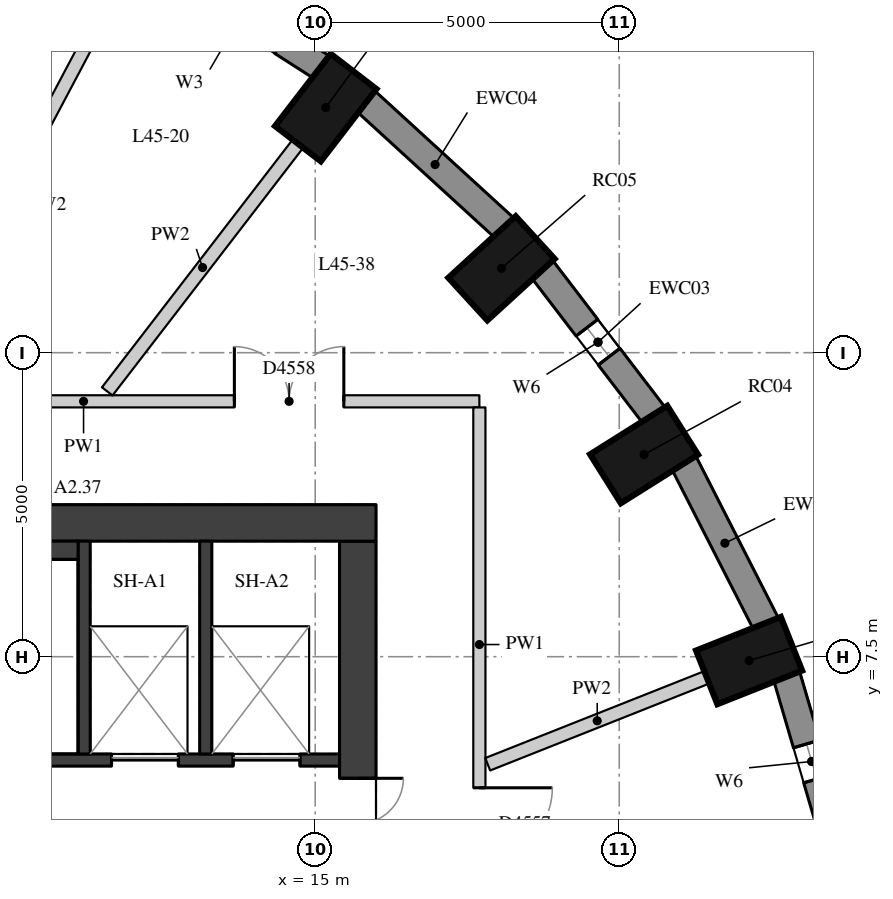
"""IFC4 building model, lengths in metres.
Left out: names, types, materials, properties, quantities, classifications, styles, units other than length and angle.
Written with IfcOpenShell. Run it as: python <this file> out.ifc"""

import sys

from ifc_helpers import new_model, si_unit, direction, frame, frame_2d, origin, origin_2d, place, context, subcontext, project, spatial, rectangle, extrude, element, fill, save


model = new_model("IFC4")
c1 = context("Model", 3, precision=1e-05, world=origin(), true_north=direction((0.0, 1.0)))
c2 = subcontext(c1, "Body", "Model", "MODEL_VIEW")
j1 = project(units=[si_unit("LENGTHUNIT", "METRE"), si_unit("PLANEANGLEUNIT", "RADIAN")], contexts=[c1])
p1 = place(None, origin())
s1 = spatial("IfcSite", under=j1, at=p1, CompositionType="ELEMENT")
p2 = place(p1, origin())
s2 = spatial("IfcBuilding", under=s1, at=p2, CompositionType="ELEMENT")
p3 = place(p2, frame((0.0, 0.0, 161.6)))
s3 = spatial("IfcBuildingStorey", under=s2, at=p3, CompositionType="ELEMENT", Elevation=161.6)
for number, where, z_axis, x_axis in (
    (1, (22.136, 7.436, 0.0), (0.0, 0.0, 1.0), (0.93, 0.369, 0.0)),
    (2, (20.408, 10.825, 0.0), (0.0, 0.0, 1.0), (0.846, 0.533, 0.0)),
    (3, (18.064, 13.888, 0.0), (0.0, 0.0, 1.0), (0.738, 0.675, 0.0)),
    (4, (15.173, 16.532, 0.0), (0.0, 0.0, 1.0), (0.61, 0.792, 0.0)),
):
    element("IfcColumn", number, at=place(p3, frame(where, z_axis=z_axis, x_axis=x_axis)), inside=s3, PredefinedType="COLUMN", context=c2, shape_type="SweptSolid", body=[
        extrude(rectangle(XDim=1.5, YDim=0.95, at=origin_2d()), origin(), (0.0, 0.0, 1.0), 3.3),
    ])
p4 = place(p3, frame((23.58, 4.362, 0.0), z_axis=(0.0, 0.0, 1.0), x_axis=(-0.281049481624, 0.959693278542, 0.0)))
e5 = element("IfcWall", 5, at=p4, inside=s3, PredefinedType="SOLIDWALL", context=c2, shape_type="SweptSolid", body=[
    extrude(rectangle(XDim=2.948, YDim=0.45, at=frame_2d((1.474, 0.0))), origin(), (0.0, 0.0, 1.0), 3.02),
])
p5 = place(p4, frame((1.174, 0.0, 0.4)))
e6 = element("IfcOpeningElement", 6, at=p5, cuts=e5, PredefinedType="OPENING", context=c2, shape_type="SweptSolid", body=[
    extrude(rectangle(XDim=0.6, YDim=1.75, at=frame_2d((0.3, 0.875))), frame((0.0, 0.235, 0.0), z_axis=(0.0, -1.0, 0.0), x_axis=(1.0, 0.0, 0.0)), (0.0, 0.0, 1.0), 0.47),
])
p6 = place(p3, frame((22.415, 8.037, 0.0), z_axis=(0.0, 0.0, 1.0), x_axis=(-0.454133999889, 0.890933392653, 0.0)))
e7 = element("IfcWall", 7, at=p6, inside=s3, PredefinedType="SOLIDWALL", context=c2, shape_type="SweptSolid", body=[
    extrude(rectangle(XDim=2.986, YDim=0.45, at=frame_2d((1.493, 0.0))), origin(), (0.0, 0.0, 1.0), 3.02),
])
p7 = place(p3, frame((20.574, 11.467, 0.0), z_axis=(0.0, 0.0, 1.0), x_axis=(-0.607817056371, 0.794077090706, 0.0)))
e8 = element("IfcWall", 8, at=p7, inside=s3, PredefinedType="SOLIDWALL", context=c2, shape_type="SweptSolid", body=[
    extrude(rectangle(XDim=3.037, YDim=0.45, at=frame_2d((1.519, 0.0))), origin(), (0.0, 0.0, 1.0), 3.02),
])
p8 = place(p7, frame((1.219, 0.0, 0.4)))
e9 = element("IfcOpeningElement", 9, at=p8, cuts=e8, PredefinedType="OPENING", context=c2, shape_type="SweptSolid", body=[
    extrude(rectangle(XDim=0.6, YDim=1.75, at=frame_2d((0.3, 0.875))), frame((0.0, 0.235, 0.0), z_axis=(0.0, -1.0, 0.0), x_axis=(1.0, 0.0, 0.0)), (0.0, 0.0, 1.0), 0.47),
])
p9 = place(p3, frame((18.113, 14.55, 0.0), z_axis=(0.0, 0.0, 1.0), x_axis=(-0.737808755941, 0.675009807082, 0.0)))
e10 = element("IfcWall", 10, at=p9, inside=s3, PredefinedType="SOLIDWALL", context=c2, shape_type="SweptSolid", body=[
    extrude(rectangle(XDim=3.094, YDim=0.45, at=frame_2d((1.547, 0.0))), origin(), (0.0, 0.0, 1.0), 3.02),
])
p10 = place(p3, frame((15.108, 17.193, 0.0), z_axis=(0.0, 0.0, 1.0), x_axis=(-0.842030726237, 0.539429565442, 0.0)))
e11 = element("IfcWall", 11, at=p10, inside=s3, PredefinedType="SOLIDWALL", context=c2, shape_type="SweptSolid", body=[
    extrude(rectangle(XDim=3.151, YDim=0.45, at=frame_2d((1.576, 0.0))), origin(), (0.0, 0.0, 1.0), 3.02),
])
p11 = place(p10, frame((0.776, 0.0, 0.4)))
e12 = element("IfcOpeningElement", 12, at=p11, cuts=e11, PredefinedType="OPENING", context=c2, shape_type="SweptSolid", body=[
    extrude(rectangle(XDim=1.6, YDim=1.75, at=frame_2d((0.8, 0.875))), frame((0.0, 0.235, 0.0), z_axis=(0.0, -1.0, 0.0), x_axis=(1.0, 0.0, 0.0)), (0.0, 0.0, 1.0), 0.47),
])
p12 = place(p3, frame((15.7, -9.4, 0.0), z_axis=(0.0, 0.0, 1.0), x_axis=(0.0, 1.0, 0.0)))
e13 = element("IfcWall", 13, at=p12, inside=s3, PredefinedType="SHEAR", context=c2, shape_type="SweptSolid", body=[
    extrude(rectangle(XDim=18.8, YDim=0.6, at=frame_2d((9.4, 0.0))), origin(), (0.0, 0.0, 1.0), 3.02),
])
p13 = place(p12, frame((13.4, 0.0, 0.0)))
e14 = element("IfcOpeningElement", 14, at=p13, cuts=e13, PredefinedType="OPENING", context=c2, shape_type="SweptSolid", body=[
    extrude(rectangle(XDim=1.5, YDim=2.1, at=frame_2d((0.75, 1.05))), frame((0.0, 0.31, 0.0), z_axis=(0.0, -1.0, 0.0), x_axis=(1.0, 0.0, 0.0)), (0.0, 0.0, 1.0), 0.62),
])
p14 = place(p12, frame((3.9, 0.0, 0.0)))
e15 = element("IfcOpeningElement", 15, at=p14, cuts=e13, PredefinedType="OPENING", context=c2, shape_type="SweptSolid", body=[
    extrude(rectangle(XDim=1.5, YDim=2.1, at=frame_2d((0.75, 1.05))), frame((0.0, 0.31, 0.0), z_axis=(0.0, -1.0, 0.0), x_axis=(1.0, 0.0, 0.0)), (0.0, 0.0, 1.0), 0.62),
])
p15 = place(p3, frame((4.0, 9.7, 0.0), z_axis=(0.0, 0.0, 1.0), x_axis=(1.0, 0.0, 0.0)))
e16 = element("IfcWall", 16, at=p15, inside=s3, PredefinedType="SHEAR", context=c2, shape_type="SweptSolid", body=[
    extrude(rectangle(XDim=12.0, YDim=0.6, at=frame_2d((6.0, 0.0))), origin(), (0.0, 0.0, 1.0), 3.02),
])
p16 = place(p3, frame((4.6, 5.8, 0.0), z_axis=(0.0, 0.0, 1.0), x_axis=(1.0, 0.0, 0.0)))
e17 = element("IfcWall", 17, at=p16, inside=s3, PredefinedType="SHEAR", context=c2, shape_type="SweptSolid", body=[
    extrude(rectangle(XDim=10.8, YDim=0.2, at=frame_2d((5.4, 0.0))), origin(), (0.0, 0.0, 1.0), 3.02),
])
p17 = place(p16, frame((7.05, 0.0, 0.0)))
e18 = element("IfcOpeningElement", 18, at=p17, cuts=e17, PredefinedType="OPENING", context=c2, shape_type="SweptSolid", body=[
    extrude(rectangle(XDim=1.1, YDim=2.1, at=frame_2d((0.55, 1.05))), frame((0.0, 0.11, 0.0), z_axis=(0.0, -1.0, 0.0), x_axis=(1.0, 0.0, 0.0)), (0.0, 0.0, 1.0), 0.22),
])
p18 = place(p16, frame((9.05, 0.0, 0.0)))
e19 = element("IfcOpeningElement", 19, at=p18, cuts=e17, PredefinedType="OPENING", context=c2, shape_type="SweptSolid", body=[
    extrude(rectangle(XDim=1.1, YDim=2.1, at=frame_2d((0.55, 1.05))), frame((0.0, 0.11, 0.0), z_axis=(0.0, -1.0, 0.0), x_axis=(1.0, 0.0, 0.0)), (0.0, 0.0, 1.0), 0.22),
])
for number, where, z_axis, x_axis in (
    (20, (11.2, 5.9, 0.0), (0.0, 0.0, 1.0), (0.0, 1.0, 0.0)),
    (21, (13.2, 5.9, 0.0), (0.0, 0.0, 1.0), (0.0, 1.0, 0.0)),
):
    element("IfcWall", number, at=place(p3, frame(where, z_axis=z_axis, x_axis=x_axis)), inside=s3, PredefinedType="SHEAR", context=c2, shape_type="SweptSolid", body=[
        extrude(rectangle(XDim=3.5, YDim=0.2, at=frame_2d((1.75, 0.0))), origin(), (0.0, 0.0, 1.0), 3.02),
    ])
p19 = place(p3, frame((6.22, 9.25, 0.0), z_axis=(0.0, 0.0, 1.0), x_axis=(1.0, 0.0, 0.0)))
e22 = element("IfcWall", 22, at=p19, inside=s3, PredefinedType="PARTITIONING", context=c2, shape_type="SweptSolid", body=[
    extrude(rectangle(XDim=4.88, YDim=0.3, at=frame_2d((2.44, 0.0))), origin(), (0.0, 0.0, 1.0), 3.02),
])
p20 = place(p3, frame((4.681, 11.7, 0.0), z_axis=(0.0, 0.0, 1.0), x_axis=(1.0, 0.0, 0.0)))
e23 = element("IfcWall", 23, at=p20, inside=s3, PredefinedType="PARTITIONING", context=c2, shape_type="SweptSolid", body=[
    extrude(rectangle(XDim=13.019, YDim=0.2, at=frame_2d((6.51, 0.0))), origin(), (0.0, 0.0, 1.0), 3.02),
])
p21 = place(p20, frame((4.662, 0.0, 0.0)))
e24 = element("IfcOpeningElement", 24, at=p21, cuts=e23, PredefinedType="OPENING", context=c2, shape_type="SweptSolid", body=[
    extrude(rectangle(XDim=0.9, YDim=2.1, at=frame_2d((0.45, 1.05))), frame((0.0, 0.11, 0.0), z_axis=(0.0, -1.0, 0.0), x_axis=(1.0, 0.0, 0.0)), (0.0, 0.0, 1.0), 0.22),
])
p22 = place(p20, frame((8.99, 0.0, 0.0)))
e25 = element("IfcOpeningElement", 25, at=p22, cuts=e23, PredefinedType="OPENING", context=c2, shape_type="SweptSolid", body=[
    extrude(rectangle(XDim=1.8, YDim=2.1, at=frame_2d((0.9, 1.05))), frame((0.0, 0.11, 0.0), z_axis=(0.0, -1.0, 0.0), x_axis=(1.0, 0.0, 0.0)), (0.0, 0.0, 1.0), 0.22),
])
p23 = place(p3, frame((17.7, 11.6, 0.0), z_axis=(0.0, 0.0, 1.0), x_axis=(0.0, -1.0, 0.0)))
e26 = element("IfcWall", 26, at=p23, inside=s3, PredefinedType="PARTITIONING", context=c2, shape_type="SweptSolid", body=[
    extrude(rectangle(XDim=7.8, YDim=0.2, at=frame_2d((3.9, 0.0))), origin(), (0.0, 0.0, 1.0), 3.02),
])
p24 = place(p23, frame((6.256, 0.0, 0.0)))
e27 = element("IfcOpeningElement", 27, at=p24, cuts=e26, PredefinedType="OPENING", context=c2, shape_type="SweptSolid", body=[
    extrude(rectangle(XDim=1.2, YDim=2.1, at=frame_2d((0.6, 1.05))), frame((0.0, 0.11, 0.0), z_axis=(0.0, -1.0, 0.0), x_axis=(1.0, 0.0, 0.0)), (0.0, 0.0, 1.0), 0.22),
])
p25 = place(p3, frame((21.439, 7.16, 0.0), z_axis=(0.0, 0.0, 1.0), x_axis=(-0.929511625875, -0.36879281089, 0.0)))
e28 = element("IfcWall", 28, at=p25, inside=s3, PredefinedType="PARTITIONING", context=c2, shape_type="SweptSolid", body=[
    extrude(rectangle(XDim=3.875, YDim=0.22, at=frame_2d((1.938, 0.0))), origin(), (0.0, 0.0, 1.0), 3.02),
])
p26 = place(p3, frame((14.716, 15.937, 0.0), z_axis=(0.0, 0.0, 1.0), x_axis=(-0.609997597499, -0.792403262894, 0.0)))
e29 = element("IfcWall", 29, at=p26, inside=s3, PredefinedType="PARTITIONING", context=c2, shape_type="SweptSolid", body=[
    extrude(rectangle(XDim=5.141, YDim=0.22, at=frame_2d((2.57, 0.0))), origin(), (0.0, 0.0, 1.0), 3.02),
])
p27 = place(p3, frame((11.474, 18.013, 0.0), z_axis=(0.0, 0.0, 1.0), x_axis=(-0.468047008097, -0.883703569197, 0.0)))
e30 = element("IfcWall", 30, at=p27, inside=s3, PredefinedType="PARTITIONING", context=c2, shape_type="SweptSolid", body=[
    extrude(rectangle(XDim=6.971, YDim=0.22, at=frame_2d((3.486, 0.0))), origin(), (0.0, 0.0, 1.0), 3.02),
])
p28 = place(p5, origin())
e31 = element("IfcWindow", 31, at=p28, inside=s3, PartitioningType="SINGLE_PANEL", PredefinedType="WINDOW", context=c2, shape_type="SweptSolid", body=[
    extrude(rectangle(XDim=0.6, YDim=1.75, at=frame_2d((0.3, 0.875))), frame((0.0, 0.035, 0.0), z_axis=(0.0, -1.0, 0.0), x_axis=(1.0, 0.0, 0.0)), (0.0, 0.0, 1.0), 0.06),
])
fill(e6, e31)
p29 = place(p8, origin())
e32 = element("IfcWindow", 32, at=p29, inside=s3, PartitioningType="SINGLE_PANEL", PredefinedType="WINDOW", context=c2, shape_type="SweptSolid", body=[
    extrude(rectangle(XDim=0.6, YDim=1.75, at=frame_2d((0.3, 0.875))), frame((0.0, 0.035, 0.0), z_axis=(0.0, -1.0, 0.0), x_axis=(1.0, 0.0, 0.0)), (0.0, 0.0, 1.0), 0.06),
])
fill(e9, e32)
p30 = place(p13, origin())
e33 = element("IfcDoor", 33, at=p30, inside=s3, OperationType="DOUBLE_DOOR_SINGLE_SWING", PredefinedType="DOOR", context=c2, shape_type="SweptSolid", body=[
    extrude(rectangle(XDim=1.5, YDim=2.1, at=frame_2d((0.75, 1.05))), frame((0.0, 0.025, 0.0), z_axis=(0.0, -1.0, 0.0), x_axis=(1.0, 0.0, 0.0)), (0.0, 0.0, 1.0), 0.05),
])
fill(e14, e33)
p31 = place(p17, origin())
e34 = element("IfcDoor", 34, at=p31, inside=s3, OperationType="DOUBLE_DOOR_SLIDING", PredefinedType="DOOR", context=c2, shape_type="SweptSolid", body=[
    extrude(rectangle(XDim=1.1, YDim=2.1, at=frame_2d((0.55, 1.05))), frame((0.0, 0.025, 0.0), z_axis=(0.0, -1.0, 0.0), x_axis=(1.0, 0.0, 0.0)), (0.0, 0.0, 1.0), 0.05),
])
fill(e18, e34)
p32 = place(p18, origin())
e35 = element("IfcDoor", 35, at=p32, inside=s3, OperationType="DOUBLE_DOOR_SLIDING", PredefinedType="DOOR", context=c2, shape_type="SweptSolid", body=[
    extrude(rectangle(XDim=1.1, YDim=2.1, at=frame_2d((0.55, 1.05))), frame((0.0, 0.025, 0.0), z_axis=(0.0, -1.0, 0.0), x_axis=(1.0, 0.0, 0.0)), (0.0, 0.0, 1.0), 0.05),
])
fill(e19, e35)
p33 = place(p24, origin())
e36 = element("IfcDoor", 36, at=p33, inside=s3, OperationType="SINGLE_SWING_LEFT", PredefinedType="DOOR", context=c2, shape_type="SweptSolid", body=[
    extrude(rectangle(XDim=1.2, YDim=2.1, at=frame_2d((0.6, 1.05))), frame((0.0, 0.025, 0.0), z_axis=(0.0, -1.0, 0.0), x_axis=(1.0, 0.0, 0.0)), (0.0, 0.0, 1.0), 0.05),
])
fill(e27, e36)
p34 = place(p22, origin())
e37 = element("IfcDoor", 37, at=p34, inside=s3, OperationType="DOUBLE_DOOR_SINGLE_SWING", PredefinedType="DOOR", context=c2, shape_type="SweptSolid", body=[
    extrude(rectangle(XDim=1.8, YDim=2.1, at=frame_2d((0.9, 1.05))), frame((0.0, 0.025, 0.0), z_axis=(0.0, -1.0, 0.0), x_axis=(1.0, 0.0, 0.0)), (0.0, 0.0, 1.0), 0.05),
])
fill(e25, e37)
save(model, sys.argv[1])
